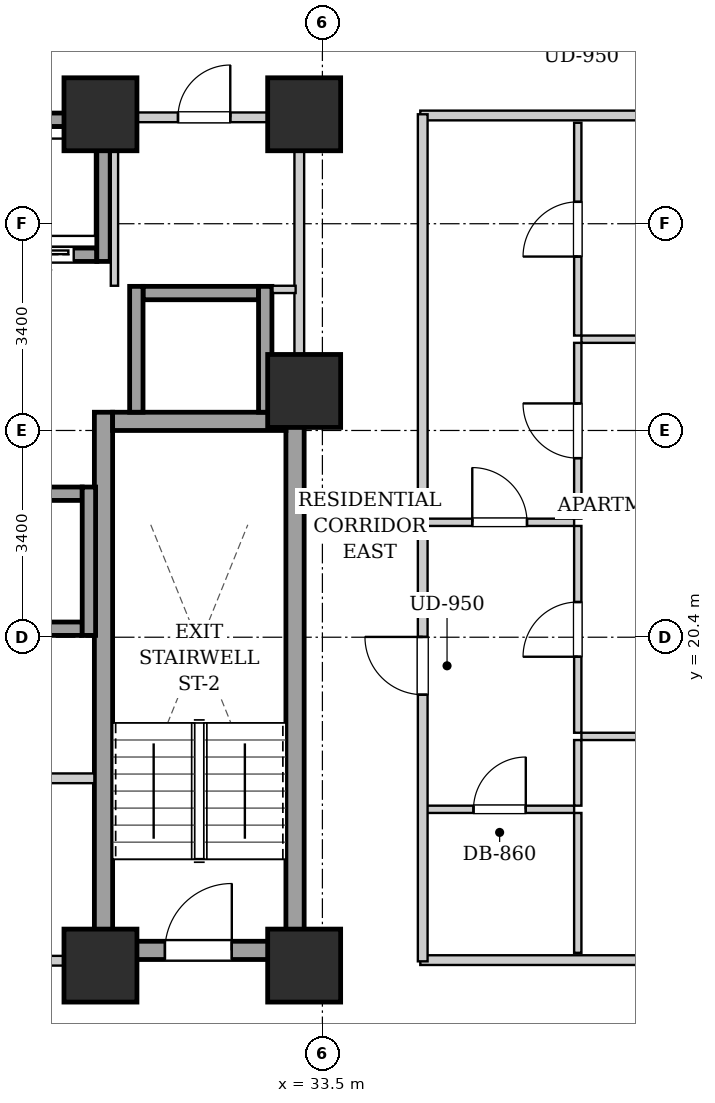
"""IFC4 building model, lengths in metres.
Left out: names, types, materials, properties, quantities, classifications, styles, units other than length and angle.
Written with IfcOpenShell. Run it as: python <this file> out.ifc"""

import sys

from ifc_helpers import new_model, si_unit, direction, frame, frame_2d, origin, origin_2d, place, context, subcontext, project, spatial, rectangle, extrude, element, fill, save


model = new_model("IFC4")
c1 = context("Model", 3, precision=1e-05, world=origin(), true_north=direction((0.0, 1.0)))
c2 = subcontext(c1, "Body", "Model", "MODEL_VIEW")
j1 = project(units=[si_unit("LENGTHUNIT", "METRE"), si_unit("PLANEANGLEUNIT", "RADIAN")], contexts=[c1])
p1 = place(None, origin())
s1 = spatial("IfcSite", under=j1, at=p1, CompositionType="ELEMENT")
p2 = place(p1, origin())
s2 = spatial("IfcBuilding", under=s1, at=p2, CompositionType="ELEMENT")
p3 = place(p2, frame((0.0, 0.0, 25.8)))
s3 = spatial("IfcBuildingStorey", under=s2, at=p3, CompositionType="ELEMENT", Elevation=25.8)
for number, where, z_axis, x_axis in (
    (1, (29.85, 15.0, 0.0), (0.0, 0.0, 1.0), (1.0, 0.0, 0.0)),
    (2, (33.2, 15.0, 0.0), (0.0, 0.0, 1.0), (1.0, 0.0, 0.0)),
    (3, (29.85, 29.0, 0.0), (0.0, 0.0, 1.0), (1.0, 0.0, 0.0)),
    (4, (33.2, 29.0, 0.0), (0.0, 0.0, 1.0), (1.0, 0.0, 0.0)),
    (5, (33.2, 24.45, 0.0), (0.0, 0.0, 1.0), (1.0, 0.0, 0.0)),
):
    element("IfcColumn", number, at=place(p3, frame(where, z_axis=z_axis, x_axis=x_axis)), inside=s3, PredefinedType="COLUMN", context=c2, shape_type="SweptSolid", body=[
        extrude(rectangle(XDim=1.2, YDim=1.2, at=origin_2d()), origin(), (0.0, 0.0, 1.0), 3.2),
    ])
for number, where, z_axis, x_axis in (
    (6, (29.9, 15.1, 0.0), (0.0, 0.0, 1.0), (0.0, 1.0, 0.0)),
    (7, (33.05, 15.1, 0.0), (0.0, 0.0, 1.0), (0.0, 1.0, 0.0)),
):
    element("IfcWall", number, at=place(p3, frame(where, z_axis=z_axis, x_axis=x_axis)), inside=s3, PredefinedType="SHEAR", context=c2, shape_type="SweptSolid", body=[
        extrude(rectangle(XDim=9.0, YDim=0.3, at=frame_2d((4.5, 0.0))), origin(), (0.0, 0.0, 1.0), 2.94),
    ])
p4 = place(p3, frame((30.05, 23.95, 0.0), z_axis=(0.0, 0.0, 1.0), x_axis=(1.0, 0.0, 0.0)))
e8 = element("IfcWall", 8, at=p4, inside=s3, PredefinedType="SHEAR", context=c2, shape_type="SweptSolid", body=[
    extrude(rectangle(XDim=2.85, YDim=0.3, at=frame_2d((1.425, 0.0))), origin(), (0.0, 0.0, 1.0), 2.94),
])
p5 = place(p3, frame((30.05, 15.25, 0.0), z_axis=(0.0, 0.0, 1.0), x_axis=(1.0, 0.0, 0.0)))
e9 = element("IfcWall", 9, at=p5, inside=s3, PredefinedType="SHEAR", context=c2, shape_type="SweptSolid", body=[
    extrude(rectangle(XDim=2.85, YDim=0.3, at=frame_2d((1.425, 0.0))), origin(), (0.0, 0.0, 1.0), 2.94),
])
p6 = place(p5, frame((0.86, 0.0, 0.0)))
e10 = element("IfcOpeningElement", 10, at=p6, cuts=e9, PredefinedType="OPENING", context=c2, shape_type="SweptSolid", body=[
    extrude(rectangle(XDim=1.1, YDim=2.05, at=frame_2d((0.55, 1.025))), frame((0.0, 0.16, 0.0), z_axis=(0.0, -1.0, 0.0), x_axis=(1.0, 0.0, 0.0)), (0.0, 0.0, 1.0), 0.32),
])
p7 = place(p3, frame((27.93, 26.69, 0.0), z_axis=(0.0, 0.0, 1.0), x_axis=(1.0, 0.0, 0.0)))
e11 = element("IfcWall", 11, at=p7, inside=s3, PredefinedType="SHEAR", context=c2, shape_type="SweptSolid", body=[
    extrude(rectangle(XDim=1.86, YDim=0.22, at=frame_2d((0.93, 0.0))), origin(), (0.0, 0.0, 1.0), 2.94),
])
p8 = place(p7, frame((0.38, 0.0, 0.0)))
e12 = element("IfcOpeningElement", 12, at=p8, cuts=e11, PredefinedType="OPENING", context=c2, shape_type="SweptSolid", body=[
    extrude(rectangle(XDim=1.1, YDim=2.15, at=frame_2d((0.55, 1.075))), frame((0.0, 0.12, 0.0), z_axis=(0.0, -1.0, 0.0), x_axis=(1.0, 0.0, 0.0)), (0.0, 0.0, 1.0), 0.24),
])
p9 = place(p3, frame((27.93, 28.91, 0.0), z_axis=(0.0, 0.0, 1.0), x_axis=(1.0, 0.0, 0.0)))
e13 = element("IfcWall", 13, at=p9, inside=s3, PredefinedType="SHEAR", context=c2, shape_type="SweptSolid", body=[
    extrude(rectangle(XDim=1.86, YDim=0.22, at=frame_2d((0.93, 0.0))), origin(), (0.0, 0.0, 1.0), 2.94),
])
p10 = place(p3, frame((29.9, 26.58, 0.0), z_axis=(0.0, 0.0, 1.0), x_axis=(0.0, 1.0, 0.0)))
e14 = element("IfcWall", 14, at=p10, inside=s3, PredefinedType="SHEAR", context=c2, shape_type="SweptSolid", body=[
    extrude(rectangle(XDim=2.44, YDim=0.22, at=frame_2d((1.22, 0.0))), origin(), (0.0, 0.0, 1.0), 2.94),
])
for number, where, z_axis, x_axis in (
    (15, (27.65, 20.54, 0.0), (0.0, 0.0, 1.0), (1.0, 0.0, 0.0)),
    (16, (27.65, 22.76, 0.0), (0.0, 0.0, 1.0), (1.0, 0.0, 0.0)),
):
    element("IfcWall", number, at=place(p3, frame(where, z_axis=z_axis, x_axis=x_axis)), inside=s3, PredefinedType="SHEAR", context=c2, shape_type="SweptSolid", body=[
        extrude(rectangle(XDim=1.9, YDim=0.22, at=frame_2d((0.95, 0.0))), origin(), (0.0, 0.0, 1.0), 2.94),
    ])
p11 = place(p3, frame((29.66, 20.43, 0.0), z_axis=(0.0, 0.0, 1.0), x_axis=(0.0, 1.0, 0.0)))
e17 = element("IfcWall", 17, at=p11, inside=s3, PredefinedType="SHEAR", context=c2, shape_type="SweptSolid", body=[
    extrude(rectangle(XDim=2.44, YDim=0.22, at=frame_2d((1.22, 0.0))), origin(), (0.0, 0.0, 1.0), 2.94),
])
p12 = place(p3, frame((30.55, 26.06, 0.0), z_axis=(0.0, 0.0, 1.0), x_axis=(1.0, 0.0, 0.0)))
e18 = element("IfcWall", 18, at=p12, inside=s3, PredefinedType="SHEAR", context=c2, shape_type="SweptSolid", body=[
    extrude(rectangle(XDim=1.9, YDim=0.22, at=frame_2d((0.95, 0.0))), origin(), (0.0, 0.0, 1.0), 2.94),
])
for number, where, z_axis, x_axis in (
    (19, (30.44, 24.1, 0.0), (0.0, 0.0, 1.0), (0.0, 1.0, 0.0)),
    (20, (32.56, 24.1, 0.0), (0.0, 0.0, 1.0), (0.0, 1.0, 0.0)),
):
    element("IfcWall", number, at=place(p3, frame(where, z_axis=z_axis, x_axis=x_axis)), inside=s3, PredefinedType="SHEAR", context=c2, shape_type="SweptSolid", body=[
        extrude(rectangle(XDim=2.07, YDim=0.22, at=frame_2d((1.035, 0.0))), origin(), (0.0, 0.0, 1.0), 2.94),
    ])
p13 = place(p3, frame((21.25, 15.08, 0.0), z_axis=(0.0, 0.0, 1.0), x_axis=(1.0, 0.0, 0.0)))
e21 = element("IfcWall", 21, at=p13, inside=s3, PredefinedType="PARTITIONING", context=c2, shape_type="SweptSolid", body=[
    extrude(rectangle(XDim=8.5, YDim=0.16, at=frame_2d((4.25, 0.0))), origin(), (0.0, 0.0, 1.0), 2.155),
])
p14 = place(p13, frame((3.725, 0.0, 0.0)))
e22 = element("IfcOpeningElement", 22, at=p14, cuts=e21, PredefinedType="OPENING", context=c2, shape_type="SweptSolid", body=[
    extrude(rectangle(XDim=1.05, YDim=2.05, at=frame_2d((0.525, 1.025))), frame((0.0, 0.09, 0.0), z_axis=(0.0, -1.0, 0.0), x_axis=(1.0, 0.0, 0.0)), (0.0, 0.0, 1.0), 0.18),
])
p15 = place(p3, frame((28.65, 18.08, 0.0), z_axis=(0.0, 0.0, 1.0), x_axis=(1.0, 0.0, 0.0)))
e23 = element("IfcWall", 23, at=p15, inside=s3, PredefinedType="PARTITIONING", context=c2, shape_type="SweptSolid", body=[
    extrude(rectangle(XDim=1.1, YDim=0.16, at=frame_2d((0.55, 0.0))), origin(), (0.0, 0.0, 1.0), 2.94),
])
p16 = place(p3, frame((33.12, 24.12, 0.0), z_axis=(0.0, 0.0, 1.0), x_axis=(0.0, 1.0, 0.0)))
e24 = element("IfcWall", 24, at=p16, inside=s3, PredefinedType="PARTITIONING", context=c2, shape_type="SweptSolid", body=[
    extrude(rectangle(XDim=4.76, YDim=0.16, at=frame_2d((2.38, 0.0))), origin(), (0.0, 0.0, 1.0), 2.94),
])
p17 = place(p3, frame((30.08, 26.18, 0.0), z_axis=(0.0, 0.0, 1.0), x_axis=(0.0, 1.0, 0.0)))
e25 = element("IfcWall", 25, at=p17, inside=s3, PredefinedType="PARTITIONING", context=c2, shape_type="SweptSolid", body=[
    extrude(rectangle(XDim=2.68, YDim=0.12, at=frame_2d((1.34, 0.0))), origin(), (0.0, 0.0, 1.0), 2.94),
])
p18 = place(p3, frame((32.68, 26.12, 0.0), z_axis=(0.0, 0.0, 1.0), x_axis=(1.0, 0.0, 0.0)))
e26 = element("IfcWall", 26, at=p18, inside=s3, PredefinedType="PARTITIONING", context=c2, shape_type="SweptSolid", body=[
    extrude(rectangle(XDim=0.38, YDim=0.12, at=frame_2d((0.19, 0.0))), origin(), (0.0, 0.0, 1.0), 2.94),
])
p19 = place(p3, frame((30.08, 28.95, 0.0), z_axis=(0.0, 0.0, 1.0), x_axis=(1.0, 0.0, 0.0)))
e27 = element("IfcWall", 27, at=p19, inside=s3, PredefinedType="PARTITIONING", context=c2, shape_type="SweptSolid", body=[
    extrude(rectangle(XDim=2.96, YDim=0.16, at=frame_2d((1.48, 0.0))), origin(), (0.0, 0.0, 1.0), 2.94),
])
p20 = place(p19, frame((1.045, 0.0, 0.0)))
e28 = element("IfcOpeningElement", 28, at=p20, cuts=e27, PredefinedType="OPENING", context=c2, shape_type="SweptSolid", body=[
    extrude(rectangle(XDim=0.86, YDim=2.05, at=frame_2d((0.43, 1.025))), frame((0.0, 0.09, 0.0), z_axis=(0.0, -1.0, 0.0), x_axis=(1.0, 0.0, 0.0)), (0.0, 0.0, 1.0), 0.18),
])
for number, where, z_axis, x_axis in (
    (29, (35.11, 15.09, 0.0), (0.0, 0.0, 1.0), (1.0, 0.0, 0.0)),
    (30, (35.11, 28.98, 0.0), (0.0, 0.0, 1.0), (1.0, 0.0, 0.0)),
):
    element("IfcWall", number, at=place(p3, frame(where, z_axis=z_axis, x_axis=x_axis)), inside=s3, PredefinedType="PARTITIONING", context=c2, shape_type="SweptSolid", body=[
        extrude(rectangle(XDim=11.11, YDim=0.16, at=frame_2d((5.555, 0.0))), origin(), (0.0, 0.0, 1.0), 2.155),
    ])
p21 = place(p3, frame((35.19, 22.29, 0.0), z_axis=(0.0, 0.0, 1.0), x_axis=(1.0, 0.0, 0.0)))
e31 = element("IfcWall", 31, at=p21, inside=s3, PredefinedType="PARTITIONING", context=c2, shape_type="SweptSolid", body=[
    extrude(rectangle(XDim=2.45, YDim=0.12, at=frame_2d((1.225, 0.0))), origin(), (0.0, 0.0, 1.0), 2.94),
])
p22 = place(p21, frame((0.775, 0.0, 0.0)))
e32 = element("IfcOpeningElement", 32, at=p22, cuts=e31, PredefinedType="OPENING", context=c2, shape_type="SweptSolid", body=[
    extrude(rectangle(XDim=0.9, YDim=2.05, at=frame_2d((0.45, 1.025))), frame((0.0, 0.07, 0.0), z_axis=(0.0, -1.0, 0.0), x_axis=(1.0, 0.0, 0.0)), (0.0, 0.0, 1.0), 0.14),
])
p23 = place(p3, frame((37.7, 22.35, 0.0), z_axis=(0.0, 0.0, 1.0), x_axis=(0.0, 1.0, 0.0)))
e33 = element("IfcWall", 33, at=p23, inside=s3, PredefinedType="PARTITIONING", context=c2, shape_type="SweptSolid", body=[
    extrude(rectangle(XDim=2.891, YDim=0.12, at=frame_2d((1.445, 0.0))), origin(), (0.0, 0.0, 1.0), 2.94),
])
p24 = place(p23, frame((0.995, 0.0, 0.0)))
e34 = element("IfcOpeningElement", 34, at=p24, cuts=e33, PredefinedType="OPENING", context=c2, shape_type="SweptSolid", body=[
    extrude(rectangle(XDim=0.9, YDim=2.05, at=frame_2d((0.45, 1.025))), frame((0.0, 0.07, 0.0), z_axis=(0.0, -1.0, 0.0), x_axis=(1.0, 0.0, 0.0)), (0.0, 0.0, 1.0), 0.14),
])
p25 = place(p3, frame((37.7, 25.361, 0.0), z_axis=(0.0, 0.0, 1.0), x_axis=(0.0, 1.0, 0.0)))
e35 = element("IfcWall", 35, at=p25, inside=s3, PredefinedType="PARTITIONING", context=c2, shape_type="SweptSolid", body=[
    extrude(rectangle(XDim=3.499, YDim=0.12, at=frame_2d((1.75, 0.0))), origin(), (0.0, 0.0, 1.0), 2.94),
])
p26 = place(p25, frame((1.299, 0.0, 0.0)))
e36 = element("IfcOpeningElement", 36, at=p26, cuts=e35, PredefinedType="OPENING", context=c2, shape_type="SweptSolid", body=[
    extrude(rectangle(XDim=0.9, YDim=2.05, at=frame_2d((0.45, 1.025))), frame((0.0, 0.07, 0.0), z_axis=(0.0, -1.0, 0.0), x_axis=(1.0, 0.0, 0.0)), (0.0, 0.0, 1.0), 0.14),
])
p27 = place(p3, frame((35.19, 17.57, 0.0), z_axis=(0.0, 0.0, 1.0), x_axis=(1.0, 0.0, 0.0)))
e37 = element("IfcWall", 37, at=p27, inside=s3, PredefinedType="PARTITIONING", context=c2, shape_type="SweptSolid", body=[
    extrude(rectangle(XDim=2.45, YDim=0.12, at=frame_2d((1.225, 0.0))), origin(), (0.0, 0.0, 1.0), 2.94),
])
p28 = place(p27, frame((0.795, 0.0, 0.0)))
e38 = element("IfcOpeningElement", 38, at=p28, cuts=e37, PredefinedType="OPENING", context=c2, shape_type="SweptSolid", body=[
    extrude(rectangle(XDim=0.86, YDim=2.05, at=frame_2d((0.43, 1.025))), frame((0.0, 0.07, 0.0), z_axis=(0.0, -1.0, 0.0), x_axis=(1.0, 0.0, 0.0)), (0.0, 0.0, 1.0), 0.14),
])
p29 = place(p3, frame((37.7, 15.21, 0.0), z_axis=(0.0, 0.0, 1.0), x_axis=(0.0, 1.0, 0.0)))
e39 = element("IfcWall", 39, at=p29, inside=s3, PredefinedType="PARTITIONING", context=c2, shape_type="SweptSolid", body=[
    extrude(rectangle(XDim=2.3, YDim=0.12, at=frame_2d((1.15, 0.0))), origin(), (0.0, 0.0, 1.0), 2.94),
])
p30 = place(p3, frame((37.7, 17.63, 0.0), z_axis=(0.0, 0.0, 1.0), x_axis=(0.0, 1.0, 0.0)))
e40 = element("IfcWall", 40, at=p30, inside=s3, PredefinedType="PARTITIONING", context=c2, shape_type="SweptSolid", body=[
    extrude(rectangle(XDim=1.079, YDim=0.12, at=frame_2d((0.54, 0.0))), origin(), (0.0, 0.0, 1.0), 2.94),
])
p31 = place(p3, frame((37.7, 18.829, 0.0), z_axis=(0.0, 0.0, 1.0), x_axis=(0.0, 1.0, 0.0)))
e41 = element("IfcWall", 41, at=p31, inside=s3, PredefinedType="PARTITIONING", context=c2, shape_type="SweptSolid", body=[
    extrude(rectangle(XDim=3.401, YDim=0.12, at=frame_2d((1.7, 0.0))), origin(), (0.0, 0.0, 1.0), 2.94),
])
p32 = place(p31, frame((1.25, 0.0, 0.0)))
e42 = element("IfcOpeningElement", 42, at=p32, cuts=e41, PredefinedType="OPENING", context=c2, shape_type="SweptSolid", body=[
    extrude(rectangle(XDim=0.9, YDim=2.05, at=frame_2d((0.45, 1.025))), frame((0.0, 0.07, 0.0), z_axis=(0.0, -1.0, 0.0), x_axis=(1.0, 0.0, 0.0)), (0.0, 0.0, 1.0), 0.14),
])
p33 = place(p3, frame((37.76, 18.769, 0.0), z_axis=(0.0, 0.0, 1.0), x_axis=(1.0, 0.0, 0.0)))
e43 = element("IfcWall", 43, at=p33, inside=s3, PredefinedType="PARTITIONING", context=c2, shape_type="SweptSolid", body=[
    extrude(rectangle(XDim=8.46, YDim=0.12, at=frame_2d((4.23, 0.0))), origin(), (0.0, 0.0, 1.0), 2.94),
])
p34 = place(p33, frame((3.765, 0.0, 0.0)))
e44 = element("IfcOpeningElement", 44, at=p34, cuts=e43, PredefinedType="OPENING", context=c2, shape_type="SweptSolid", body=[
    extrude(rectangle(XDim=0.9, YDim=2.05, at=frame_2d((0.45, 1.025))), frame((0.0, 0.07, 0.0), z_axis=(0.0, -1.0, 0.0), x_axis=(1.0, 0.0, 0.0)), (0.0, 0.0, 1.0), 0.14),
])
p35 = place(p3, frame((37.76, 25.301, 0.0), z_axis=(0.0, 0.0, 1.0), x_axis=(1.0, 0.0, 0.0)))
e45 = element("IfcWall", 45, at=p35, inside=s3, PredefinedType="PARTITIONING", context=c2, shape_type="SweptSolid", body=[
    extrude(rectangle(XDim=8.46, YDim=0.12, at=frame_2d((4.23, 0.0))), origin(), (0.0, 0.0, 1.0), 2.94),
])
p36 = place(p35, frame((3.765, 0.0, 0.0)))
e46 = element("IfcOpeningElement", 46, at=p36, cuts=e45, PredefinedType="OPENING", context=c2, shape_type="SweptSolid", body=[
    extrude(rectangle(XDim=0.9, YDim=2.05, at=frame_2d((0.45, 1.025))), frame((0.0, 0.07, 0.0), z_axis=(0.0, -1.0, 0.0), x_axis=(1.0, 0.0, 0.0)), (0.0, 0.0, 1.0), 0.14),
])
p37 = place(p3, frame((35.15, 15.07, 0.0), z_axis=(0.0, 0.0, 1.0), x_axis=(0.0, 1.0, 0.0)))
e47 = element("IfcWall", 47, at=p37, inside=s3, PredefinedType="PARTITIONING", context=c2, shape_type="SweptSolid", body=[
    extrude(rectangle(XDim=13.93, YDim=0.16, at=frame_2d((6.965, 0.0))), origin(), (0.0, 0.0, 1.0), 2.94),
])
p38 = place(p37, frame((4.385, 0.0, 0.0)))
e48 = element("IfcOpeningElement", 48, at=p38, cuts=e47, PredefinedType="OPENING", context=c2, shape_type="SweptSolid", body=[
    extrude(rectangle(XDim=0.95, YDim=2.1, at=frame_2d((0.475, 1.05))), frame((0.0, 0.09, 0.0), z_axis=(0.0, -1.0, 0.0), x_axis=(1.0, 0.0, 0.0)), (0.0, 0.0, 1.0), 0.18),
])
p39 = place(p6, origin())
e49 = element("IfcDoor", 49, at=p39, inside=s3, OperationType="SINGLE_SWING_RIGHT", PredefinedType="DOOR", context=c2, shape_type="SweptSolid", body=[
    extrude(rectangle(XDim=1.1, YDim=2.05, at=frame_2d((0.55, 1.025))), frame((0.0, 0.025, 0.0), z_axis=(0.0, -1.0, 0.0), x_axis=(1.0, 0.0, 0.0)), (0.0, 0.0, 1.0), 0.05),
])
fill(e10, e49)
p40 = place(p8, origin())
e50 = element("IfcDoor", 50, at=p40, inside=s3, OperationType="SLIDING_TO_LEFT", PredefinedType="DOOR", context=c2, shape_type="SweptSolid", body=[
    extrude(rectangle(XDim=1.1, YDim=2.15, at=frame_2d((0.55, 1.075))), frame((0.0, 0.025, 0.0), z_axis=(0.0, -1.0, 0.0), x_axis=(1.0, 0.0, 0.0)), (0.0, 0.0, 1.0), 0.05),
])
fill(e12, e50)
p41 = place(p20, origin())
e51 = element("IfcDoor", 51, at=p41, inside=s3, OperationType="SINGLE_SWING_RIGHT", PredefinedType="DOOR", context=c2, shape_type="SweptSolid", body=[
    extrude(rectangle(XDim=0.86, YDim=2.05, at=frame_2d((0.43, 1.025))), frame((0.0, 0.025, 0.0), z_axis=(0.0, -1.0, 0.0), x_axis=(1.0, 0.0, 0.0)), (0.0, 0.0, 1.0), 0.05),
])
fill(e28, e51)
p42 = place(p22, origin())
e52 = element("IfcDoor", 52, at=p42, inside=s3, OperationType="SINGLE_SWING_LEFT", PredefinedType="DOOR", context=c2, shape_type="SweptSolid", body=[
    extrude(rectangle(XDim=0.9, YDim=2.05, at=frame_2d((0.45, 1.025))), frame((0.0, 0.025, 0.0), z_axis=(0.0, -1.0, 0.0), x_axis=(1.0, 0.0, 0.0)), (0.0, 0.0, 1.0), 0.05),
])
fill(e32, e52)
p43 = place(p24, origin())
e53 = element("IfcDoor", 53, at=p43, inside=s3, OperationType="SINGLE_SWING_RIGHT", PredefinedType="DOOR", context=c2, shape_type="SweptSolid", body=[
    extrude(rectangle(XDim=0.9, YDim=2.05, at=frame_2d((0.45, 1.025))), frame((0.0, 0.025, 0.0), z_axis=(0.0, -1.0, 0.0), x_axis=(1.0, 0.0, 0.0)), (0.0, 0.0, 1.0), 0.05),
])
fill(e34, e53)
p44 = place(p26, origin())
e54 = element("IfcDoor", 54, at=p44, inside=s3, OperationType="SINGLE_SWING_LEFT", PredefinedType="DOOR", context=c2, shape_type="SweptSolid", body=[
    extrude(rectangle(XDim=0.9, YDim=2.05, at=frame_2d((0.45, 1.025))), frame((0.0, 0.025, 0.0), z_axis=(0.0, -1.0, 0.0), x_axis=(1.0, 0.0, 0.0)), (0.0, 0.0, 1.0), 0.05),
])
fill(e36, e54)
p45 = place(p28, origin())
e55 = element("IfcDoor", 55, at=p45, inside=s3, OperationType="SINGLE_SWING_RIGHT", PredefinedType="DOOR", context=c2, shape_type="SweptSolid", body=[
    extrude(rectangle(XDim=0.86, YDim=2.05, at=frame_2d((0.43, 1.025))), frame((0.0, 0.025, 0.0), z_axis=(0.0, -1.0, 0.0), x_axis=(1.0, 0.0, 0.0)), (0.0, 0.0, 1.0), 0.05),
])
fill(e38, e55)
p46 = place(p32, origin())
e56 = element("IfcDoor", 56, at=p46, inside=s3, OperationType="SINGLE_SWING_LEFT", PredefinedType="DOOR", context=c2, shape_type="SweptSolid", body=[
    extrude(rectangle(XDim=0.9, YDim=2.05, at=frame_2d((0.45, 1.025))), frame((0.0, 0.025, 0.0), z_axis=(0.0, -1.0, 0.0), x_axis=(1.0, 0.0, 0.0)), (0.0, 0.0, 1.0), 0.05),
])
fill(e42, e56)
p47 = place(p38, origin())
e57 = element("IfcDoor", 57, at=p47, inside=s3, OperationType="SINGLE_SWING_RIGHT", PredefinedType="DOOR", context=c2, shape_type="SweptSolid", body=[
    extrude(rectangle(XDim=0.95, YDim=2.1, at=frame_2d((0.475, 1.05))), frame((0.0, 0.025, 0.0), z_axis=(0.0, -1.0, 0.0), x_axis=(1.0, 0.0, 0.0)), (0.0, 0.0, 1.0), 0.05),
])
fill(e48, e57)
save(model, sys.argv[1])
